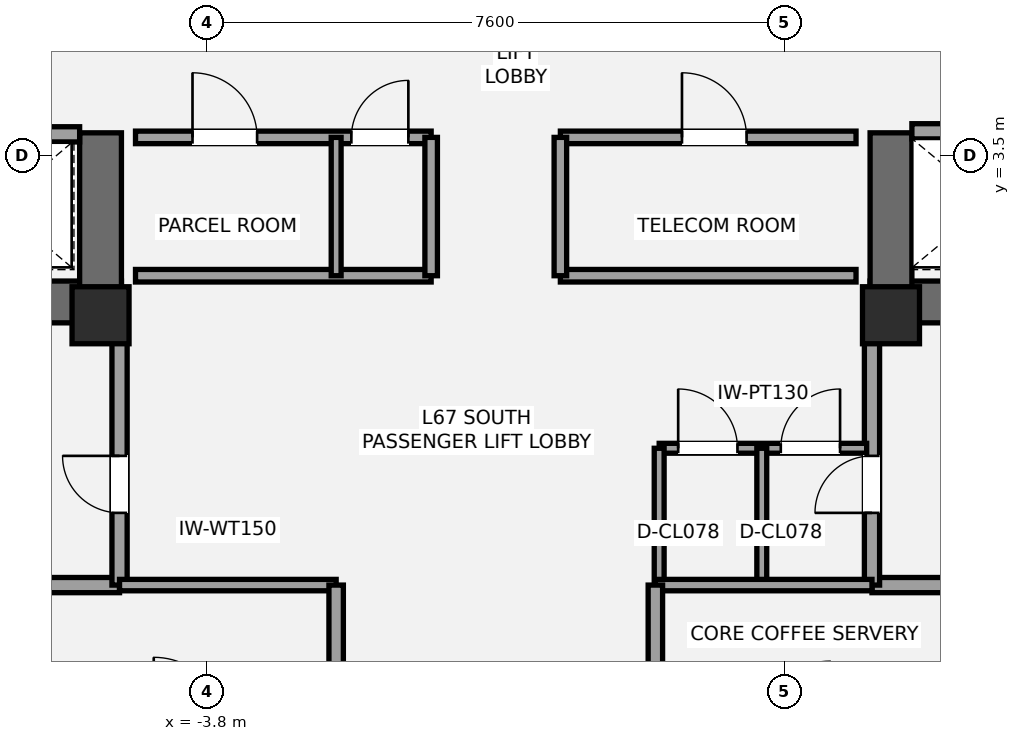
"""IFC4 building model, lengths in metres.
Left out: names, types, materials, properties, quantities, classifications, styles, units other than length and angle.
Written with IfcOpenShell. Run it as: python <this file> out.ifc"""

import sys

from ifc_helpers import new_model, si_unit, direction, frame, frame_2d, origin, origin_2d, place, context, subcontext, project, spatial, rectangle, extrude, element, fill, save


model = new_model("IFC4")
c1 = context("Model", 3, precision=1e-05, world=origin(), true_north=direction((0.0, 1.0)))
c2 = subcontext(c1, "Body", "Model", "MODEL_VIEW")
j1 = project(units=[si_unit("LENGTHUNIT", "METRE"), si_unit("PLANEANGLEUNIT", "RADIAN")], contexts=[c1])
p1 = place(None, origin())
s1 = spatial("IfcSite", under=j1, at=p1, CompositionType="ELEMENT")
p2 = place(p1, origin())
s2 = spatial("IfcBuilding", under=s1, at=p2, CompositionType="ELEMENT")
p3 = place(p2, frame((0.0, 0.0, 238.35)))
s3 = spatial("IfcBuildingStorey", under=s2, at=p3, CompositionType="ELEMENT", Elevation=238.35)
p4 = place(p3, frame((-4.925, 1.575, 0.0), z_axis=(0.0, 0.0, 1.0), x_axis=(-1.0, 0.0, 0.0)))
e1 = element("IfcWall", 1, at=p4, inside=s3, PredefinedType="SHEAR", context=c2, shape_type="SweptSolid", body=[
    extrude(rectangle(XDim=8.775, YDim=0.55, at=frame_2d((4.387, 0.0))), origin(), (0.0, 0.0, 1.0), 3.15),
])
p5 = place(p4, frame((5.375, 0.0, 0.0)))
e2 = element("IfcOpeningElement", 2, at=p5, cuts=e1, PredefinedType="OPENING", context=c2, shape_type="SweptSolid", body=[
    extrude(rectangle(XDim=1.05, YDim=2.15, at=frame_2d((0.525, 1.075))), frame((0.0, 0.285, 0.0), z_axis=(0.0, -1.0, 0.0), x_axis=(1.0, 0.0, 0.0)), (0.0, 0.0, 1.0), 0.57),
])
p6 = place(p4, frame((3.705, 0.0, 0.0)))
e3 = element("IfcOpeningElement", 3, at=p6, cuts=e1, PredefinedType="OPENING", context=c2, shape_type="SweptSolid", body=[
    extrude(rectangle(XDim=1.1, YDim=2.2, at=frame_2d((0.55, 1.1))), frame((0.0, 0.285, 0.0), z_axis=(0.0, -1.0, 0.0), x_axis=(1.0, 0.0, 0.0)), (0.0, 0.0, 1.0), 0.57),
])
p7 = place(p3, frame((-5.2, 1.3, 0.0), z_axis=(0.0, 0.0, 1.0), x_axis=(0.0, 1.0, 0.0)))
e4 = element("IfcWall", 4, at=p7, inside=s3, PredefinedType="SHEAR", context=c2, shape_type="SweptSolid", body=[
    extrude(rectangle(XDim=2.5, YDim=0.55, at=frame_2d((1.25, 0.0))), origin(), (0.0, 0.0, 1.0), 3.15),
])
p8 = place(p3, frame((13.7, 1.575, 0.0), z_axis=(0.0, 0.0, 1.0), x_axis=(-1.0, 0.0, 0.0)))
e5 = element("IfcWall", 5, at=p8, inside=s3, PredefinedType="SHEAR", context=c2, shape_type="SweptSolid", body=[
    extrude(rectangle(XDim=8.775, YDim=0.55, at=frame_2d((4.387, 0.0))), origin(), (0.0, 0.0, 1.0), 3.15),
])
p9 = place(p8, frame((2.35, 0.0, 0.0)))
e6 = element("IfcOpeningElement", 6, at=p9, cuts=e5, PredefinedType="OPENING", context=c2, shape_type="SweptSolid", body=[
    extrude(rectangle(XDim=1.05, YDim=2.15, at=frame_2d((0.525, 1.075))), frame((0.0, 0.285, 0.0), z_axis=(0.0, -1.0, 0.0), x_axis=(1.0, 0.0, 0.0)), (0.0, 0.0, 1.0), 0.57),
])
p10 = place(p8, frame((4.35, 0.0, 0.0)))
e7 = element("IfcOpeningElement", 7, at=p10, cuts=e5, PredefinedType="OPENING", context=c2, shape_type="SweptSolid", body=[
    extrude(rectangle(XDim=1.1, YDim=2.2, at=frame_2d((0.55, 1.1))), frame((0.0, 0.285, 0.0), z_axis=(0.0, -1.0, 0.0), x_axis=(1.0, 0.0, 0.0)), (0.0, 0.0, 1.0), 0.57),
])
p11 = place(p3, frame((5.2, 1.3, 0.0), z_axis=(0.0, 0.0, 1.0), x_axis=(0.0, 1.0, 0.0)))
e8 = element("IfcWall", 8, at=p11, inside=s3, PredefinedType="SHEAR", context=c2, shape_type="SweptSolid", body=[
    extrude(rectangle(XDim=2.5, YDim=0.55, at=frame_2d((1.25, 0.0))), origin(), (0.0, 0.0, 1.0), 3.15),
])
for number, where, z_axis, x_axis in (
    (9, (-5.2, 1.4, 0.0), (0.0, 0.0, 1.0), (1.0, 0.0, 0.0)),
    (10, (5.2, 1.4, 0.0), (0.0, 0.0, 1.0), (1.0, 0.0, 0.0)),
):
    element("IfcColumn", number, at=place(p3, frame(where, z_axis=z_axis, x_axis=x_axis)), inside=s3, PredefinedType="PILASTER", context=c2, shape_type="SweptSolid", body=[
        extrude(rectangle(XDim=0.75, YDim=0.75, at=origin_2d()), origin(), (0.0, 0.0, 1.0), 3.15),
    ])
p12 = place(p3, frame((-7.2, -2.15, 0.0), z_axis=(0.0, 0.0, 1.0), x_axis=(1.0, 0.0, 0.0)))
e11 = element("IfcWall", 11, at=p12, inside=s3, PredefinedType="SOLIDWALL", context=c2, shape_type="SweptSolid", body=[
    extrude(rectangle(XDim=2.25, YDim=0.2, at=frame_2d((1.125, 0.0))), origin(), (0.0, 0.0, 1.0), 2.97),
])
p13 = place(p3, frame((-4.95, -2.15, 0.0), z_axis=(0.0, 0.0, 1.0), x_axis=(0.0, 1.0, 0.0)))
e12 = element("IfcWall", 12, at=p13, inside=s3, PredefinedType="SOLIDWALL", context=c2, shape_type="SweptSolid", body=[
    extrude(rectangle(XDim=3.5, YDim=0.2, at=frame_2d((1.75, 0.0))), origin(), (0.0, 0.0, 1.0), 2.423),
])
p14 = place(p13, frame((0.95, 0.0, 0.0)))
e13 = element("IfcOpeningElement", 13, at=p14, cuts=e12, PredefinedType="OPENING", context=c2, shape_type="SweptSolid", body=[
    extrude(rectangle(XDim=0.75, YDim=2.1, at=frame_2d((0.375, 1.05))), frame((0.0, 0.11, 0.0), z_axis=(0.0, -1.0, 0.0), x_axis=(1.0, 0.0, 0.0)), (0.0, 0.0, 1.0), 0.22),
])
p15 = place(p3, frame((4.95, -2.15, 0.0), z_axis=(0.0, 0.0, 1.0), x_axis=(1.0, 0.0, 0.0)))
e14 = element("IfcWall", 14, at=p15, inside=s3, PredefinedType="SOLIDWALL", context=c2, shape_type="SweptSolid", body=[
    extrude(rectangle(XDim=2.25, YDim=0.2, at=frame_2d((1.125, 0.0))), origin(), (0.0, 0.0, 1.0), 2.97),
])
p16 = place(p3, frame((4.95, -2.15, 0.0), z_axis=(0.0, 0.0, 1.0), x_axis=(0.0, 1.0, 0.0)))
e15 = element("IfcWall", 15, at=p16, inside=s3, PredefinedType="SOLIDWALL", context=c2, shape_type="SweptSolid", body=[
    extrude(rectangle(XDim=3.5, YDim=0.2, at=frame_2d((1.75, 0.0))), origin(), (0.0, 0.0, 1.0), 2.423),
])
p17 = place(p16, frame((0.95, 0.0, 0.0)))
e16 = element("IfcOpeningElement", 16, at=p17, cuts=e15, PredefinedType="OPENING", context=c2, shape_type="SweptSolid", body=[
    extrude(rectangle(XDim=0.75, YDim=2.1, at=frame_2d((0.375, 1.05))), frame((0.0, 0.11, 0.0), z_axis=(0.0, -1.0, 0.0), x_axis=(1.0, 0.0, 0.0)), (0.0, 0.0, 1.0), 0.22),
])
p18 = place(p3, frame((2.15, -0.35, 0.0), z_axis=(0.0, 0.0, 1.0), x_axis=(1.0, 0.0, 0.0)))
e17 = element("IfcWall", 17, at=p18, inside=s3, PredefinedType="PARTITIONING", context=c2, shape_type="SweptSolid", body=[
    extrude(rectangle(XDim=2.73, YDim=0.13, at=frame_2d((1.365, 0.0))), origin(), (0.0, 0.0, 1.0), 2.97),
])
p19 = place(p18, frame((0.25, 0.0, 0.0)))
e18 = element("IfcOpeningElement", 18, at=p19, cuts=e17, PredefinedType="OPENING", context=c2, shape_type="SweptSolid", body=[
    extrude(rectangle(XDim=0.78, YDim=2.1, at=frame_2d((0.39, 1.05))), frame((0.0, 0.075, 0.0), z_axis=(0.0, -1.0, 0.0), x_axis=(1.0, 0.0, 0.0)), (0.0, 0.0, 1.0), 0.15),
])
p20 = place(p18, frame((1.6, 0.0, 0.0)))
e19 = element("IfcOpeningElement", 19, at=p20, cuts=e17, PredefinedType="OPENING", context=c2, shape_type="SweptSolid", body=[
    extrude(rectangle(XDim=0.78, YDim=2.1, at=frame_2d((0.39, 1.05))), frame((0.0, 0.075, 0.0), z_axis=(0.0, -1.0, 0.0), x_axis=(1.0, 0.0, 0.0)), (0.0, 0.0, 1.0), 0.15),
])
for number, where, z_axis, x_axis in (
    (20, (2.15, -2.15, 0.0), (0.0, 0.0, 1.0), (0.0, 1.0, 0.0)),
    (21, (3.5, -2.15, 0.0), (0.0, 0.0, 1.0), (0.0, 1.0, 0.0)),
):
    element("IfcWall", number, at=place(p3, frame(where, z_axis=z_axis, x_axis=x_axis)), inside=s3, PredefinedType="PARTITIONING", context=c2, shape_type="SweptSolid", body=[
        extrude(rectangle(XDim=1.8, YDim=0.13, at=frame_2d((0.9, 0.0))), origin(), (0.0, 0.0, 1.0), 2.97),
    ])
p21 = place(p3, frame((-9.78, 3.78, 0.0), z_axis=(0.0, 0.0, 1.0), x_axis=(1.0, 0.0, 0.0)))
e22 = element("IfcWall", 22, at=p21, inside=s3, PredefinedType="SOLIDWALL", context=c2, shape_type="SweptSolid", body=[
    extrude(rectangle(XDim=4.305, YDim=0.2, at=frame_2d((2.152, 0.0))), origin(), (0.0, 0.0, 1.0), 2.97),
])
p22 = place(p21, frame((2.72, 0.0, 0.0)))
e23 = element("IfcOpeningElement", 23, at=p22, cuts=e22, PredefinedType="OPENING", context=c2, shape_type="SweptSolid", body=[
    extrude(rectangle(XDim=1.1, YDim=2.2, at=frame_2d((0.55, 1.1))), frame((0.0, 0.11, 0.0), z_axis=(0.0, -1.0, 0.0), x_axis=(1.0, 0.0, 0.0)), (0.0, 0.0, 1.0), 0.22),
])
p23 = place(p3, frame((5.475, 3.82, 0.0), z_axis=(0.0, 0.0, 1.0), x_axis=(1.0, 0.0, 0.0)))
e24 = element("IfcWall", 24, at=p23, inside=s3, PredefinedType="SOLIDWALL", context=c2, shape_type="SweptSolid", body=[
    extrude(rectangle(XDim=4.305, YDim=0.2, at=frame_2d((2.152, 0.0))), origin(), (0.0, 0.0, 1.0), 2.97),
])
p24 = place(p23, frame((0.65, 0.0, 0.0)))
e25 = element("IfcOpeningElement", 25, at=p24, cuts=e24, PredefinedType="OPENING", context=c2, shape_type="SweptSolid", body=[
    extrude(rectangle(XDim=1.2, YDim=2.2, at=frame_2d((0.6, 1.1))), frame((0.0, 0.11, 0.0), z_axis=(0.0, -1.0, 0.0), x_axis=(1.0, 0.0, 0.0)), (0.0, 0.0, 1.0), 0.22),
])
p25 = place(p3, frame((-4.74, 1.92, 0.0), z_axis=(0.0, 0.0, 1.0), x_axis=(1.0, 0.0, 0.0)))
e26 = element("IfcWall", 26, at=p25, inside=s3, PredefinedType="PARTITIONING", context=c2, shape_type="SweptSolid", body=[
    extrude(rectangle(XDim=3.89, YDim=0.165, at=frame_2d((1.945, 0.0))), origin(), (0.0, 0.0, 1.0), 2.11),
])
p26 = place(p3, frame((-4.74, 3.74, 0.0), z_axis=(0.0, 0.0, 1.0), x_axis=(1.0, 0.0, 0.0)))
e27 = element("IfcWall", 27, at=p26, inside=s3, PredefinedType="PARTITIONING", context=c2, shape_type="SweptSolid", body=[
    extrude(rectangle(XDim=3.89, YDim=0.165, at=frame_2d((1.945, 0.0))), origin(), (0.0, 0.0, 1.0), 2.97),
])
p27 = place(p26, frame((0.75, 0.0, 0.0)))
e28 = element("IfcOpeningElement", 28, at=p27, cuts=e27, PredefinedType="OPENING", context=c2, shape_type="SweptSolid", body=[
    extrude(rectangle(XDim=0.85, YDim=2.1, at=frame_2d((0.425, 1.05))), frame((0.0, 0.093, 0.0), z_axis=(0.0, -1.0, 0.0), x_axis=(1.0, 0.0, 0.0)), (0.0, 0.0, 1.0), 0.185),
])
p28 = place(p26, frame((2.84, 0.0, 0.0)))
e29 = element("IfcOpeningElement", 29, at=p28, cuts=e27, PredefinedType="OPENING", context=c2, shape_type="SweptSolid", body=[
    extrude(rectangle(XDim=0.75, YDim=2.1, at=frame_2d((0.375, 1.05))), frame((0.0, 0.093, 0.0), z_axis=(0.0, -1.0, 0.0), x_axis=(1.0, 0.0, 0.0)), (0.0, 0.0, 1.0), 0.185),
])
p29 = place(p3, frame((-0.85, 1.92, 0.0), z_axis=(0.0, 0.0, 1.0), x_axis=(0.0, 1.0, 0.0)))
e30 = element("IfcWall", 30, at=p29, inside=s3, PredefinedType="PARTITIONING", context=c2, shape_type="SweptSolid", body=[
    extrude(rectangle(XDim=1.82, YDim=0.165, at=frame_2d((0.91, 0.0))), origin(), (0.0, 0.0, 1.0), 2.97),
])
p30 = place(p3, frame((0.85, 1.92, 0.0), z_axis=(0.0, 0.0, 1.0), x_axis=(1.0, 0.0, 0.0)))
e31 = element("IfcWall", 31, at=p30, inside=s3, PredefinedType="PARTITIONING", context=c2, shape_type="SweptSolid", body=[
    extrude(rectangle(XDim=3.89, YDim=0.165, at=frame_2d((1.945, 0.0))), origin(), (0.0, 0.0, 1.0), 2.11),
])
p31 = place(p3, frame((0.85, 3.74, 0.0), z_axis=(0.0, 0.0, 1.0), x_axis=(1.0, 0.0, 0.0)))
e32 = element("IfcWall", 32, at=p31, inside=s3, PredefinedType="PARTITIONING", context=c2, shape_type="SweptSolid", body=[
    extrude(rectangle(XDim=3.89, YDim=0.165, at=frame_2d((1.945, 0.0))), origin(), (0.0, 0.0, 1.0), 2.97),
])
p32 = place(p31, frame((1.6, 0.0, 0.0)))
e33 = element("IfcOpeningElement", 33, at=p32, cuts=e32, PredefinedType="OPENING", context=c2, shape_type="SweptSolid", body=[
    extrude(rectangle(XDim=0.85, YDim=2.1, at=frame_2d((0.425, 1.05))), frame((0.0, 0.093, 0.0), z_axis=(0.0, -1.0, 0.0), x_axis=(1.0, 0.0, 0.0)), (0.0, 0.0, 1.0), 0.185),
])
p33 = place(p3, frame((0.85, 1.92, 0.0), z_axis=(0.0, 0.0, 1.0), x_axis=(0.0, 1.0, 0.0)))
e34 = element("IfcWall", 34, at=p33, inside=s3, PredefinedType="PARTITIONING", context=c2, shape_type="SweptSolid", body=[
    extrude(rectangle(XDim=1.82, YDim=0.165, at=frame_2d((0.91, 0.0))), origin(), (0.0, 0.0, 1.0), 2.97),
])
p34 = place(p3, frame((-2.1, 1.92, 0.0), z_axis=(0.0, 0.0, 1.0), x_axis=(0.0, 1.0, 0.0)))
e35 = element("IfcWall", 35, at=p34, inside=s3, PredefinedType="PARTITIONING", context=c2, shape_type="SweptSolid", body=[
    extrude(rectangle(XDim=1.82, YDim=0.13, at=frame_2d((0.91, 0.0))), origin(), (0.0, 0.0, 1.0), 2.97),
])
p35 = place(p3, frame((-4.95, -2.15, 0.0), z_axis=(0.0, 0.0, 1.0), x_axis=(1.0, 0.0, 0.0)))
e36 = element("IfcWall", 36, at=p35, inside=s3, PredefinedType="PLUMBINGWALL", context=c2, shape_type="SweptSolid", body=[
    extrude(rectangle(XDim=2.85, YDim=0.15, at=frame_2d((1.425, 0.0))), origin(), (0.0, 0.0, 1.0), 2.97),
])
p36 = place(p3, frame((-2.1, -4.05, 0.0), z_axis=(0.0, 0.0, 1.0), x_axis=(0.0, 1.0, 0.0)))
e37 = element("IfcWall", 37, at=p36, inside=s3, PredefinedType="PLUMBINGWALL", context=c2, shape_type="SweptSolid", body=[
    extrude(rectangle(XDim=1.9, YDim=0.19, at=frame_2d((0.95, 0.0))), origin(), (0.0, 0.0, 1.0), 2.423),
])
p37 = place(p3, frame((2.1, -2.15, 0.0), z_axis=(0.0, 0.0, 1.0), x_axis=(1.0, 0.0, 0.0)))
e38 = element("IfcWall", 38, at=p37, inside=s3, PredefinedType="PLUMBINGWALL", context=c2, shape_type="SweptSolid", body=[
    extrude(rectangle(XDim=2.85, YDim=0.15, at=frame_2d((1.425, 0.0))), origin(), (0.0, 0.0, 1.0), 2.97),
])
p38 = place(p3, frame((2.1, -4.05, 0.0), z_axis=(0.0, 0.0, 1.0), x_axis=(0.0, 1.0, 0.0)))
e39 = element("IfcWall", 39, at=p38, inside=s3, PredefinedType="PLUMBINGWALL", context=c2, shape_type="SweptSolid", body=[
    extrude(rectangle(XDim=1.9, YDim=0.19, at=frame_2d((0.95, 0.0))), origin(), (0.0, 0.0, 1.0), 2.97),
])
p39 = place(p14, origin())
e40 = element("IfcDoor", 40, at=p39, inside=s3, OperationType="SINGLE_SWING_RIGHT", PredefinedType="DOOR", context=c2, shape_type="SweptSolid", body=[
    extrude(rectangle(XDim=0.75, YDim=2.1, at=frame_2d((0.375, 1.05))), frame((0.0, 0.025, 0.0), z_axis=(0.0, -1.0, 0.0), x_axis=(1.0, 0.0, 0.0)), (0.0, 0.0, 1.0), 0.05),
])
fill(e13, e40)
p40 = place(p17, origin())
e41 = element("IfcDoor", 41, at=p40, inside=s3, OperationType="SINGLE_SWING_LEFT", PredefinedType="DOOR", context=c2, shape_type="SweptSolid", body=[
    extrude(rectangle(XDim=0.75, YDim=2.1, at=frame_2d((0.375, 1.05))), frame((0.0, 0.025, 0.0), z_axis=(0.0, -1.0, 0.0), x_axis=(1.0, 0.0, 0.0)), (0.0, 0.0, 1.0), 0.05),
])
fill(e16, e41)
p41 = place(p19, origin())
e42 = element("IfcDoor", 42, at=p41, inside=s3, OperationType="SINGLE_SWING_LEFT", PredefinedType="DOOR", context=c2, shape_type="SweptSolid", body=[
    extrude(rectangle(XDim=0.78, YDim=2.1, at=frame_2d((0.39, 1.05))), frame((0.0, 0.025, 0.0), z_axis=(0.0, -1.0, 0.0), x_axis=(1.0, 0.0, 0.0)), (0.0, 0.0, 1.0), 0.05),
])
fill(e18, e42)
p42 = place(p20, origin())
e43 = element("IfcDoor", 43, at=p42, inside=s3, OperationType="SINGLE_SWING_RIGHT", PredefinedType="DOOR", context=c2, shape_type="SweptSolid", body=[
    extrude(rectangle(XDim=0.78, YDim=2.1, at=frame_2d((0.39, 1.05))), frame((0.0, 0.025, 0.0), z_axis=(0.0, -1.0, 0.0), x_axis=(1.0, 0.0, 0.0)), (0.0, 0.0, 1.0), 0.05),
])
fill(e19, e43)
p43 = place(p27, origin())
e44 = element("IfcDoor", 44, at=p43, inside=s3, OperationType="SINGLE_SWING_LEFT", PredefinedType="DOOR", context=c2, shape_type="SweptSolid", body=[
    extrude(rectangle(XDim=0.85, YDim=2.1, at=frame_2d((0.425, 1.05))), frame((0.0, 0.025, 0.0), z_axis=(0.0, -1.0, 0.0), x_axis=(1.0, 0.0, 0.0)), (0.0, 0.0, 1.0), 0.05),
])
fill(e28, e44)
p44 = place(p28, origin())
e45 = element("IfcDoor", 45, at=p44, inside=s3, OperationType="SINGLE_SWING_RIGHT", PredefinedType="DOOR", context=c2, shape_type="SweptSolid", body=[
    extrude(rectangle(XDim=0.75, YDim=2.1, at=frame_2d((0.375, 1.05))), frame((0.0, 0.025, 0.0), z_axis=(0.0, -1.0, 0.0), x_axis=(1.0, 0.0, 0.0)), (0.0, 0.0, 1.0), 0.05),
])
fill(e29, e45)
p45 = place(p32, origin())
e46 = element("IfcDoor", 46, at=p45, inside=s3, OperationType="SINGLE_SWING_LEFT", PredefinedType="DOOR", context=c2, shape_type="SweptSolid", body=[
    extrude(rectangle(XDim=0.85, YDim=2.1, at=frame_2d((0.425, 1.05))), frame((0.0, 0.025, 0.0), z_axis=(0.0, -1.0, 0.0), x_axis=(1.0, 0.0, 0.0)), (0.0, 0.0, 1.0), 0.05),
])
fill(e33, e46)
save(model, sys.argv[1])
